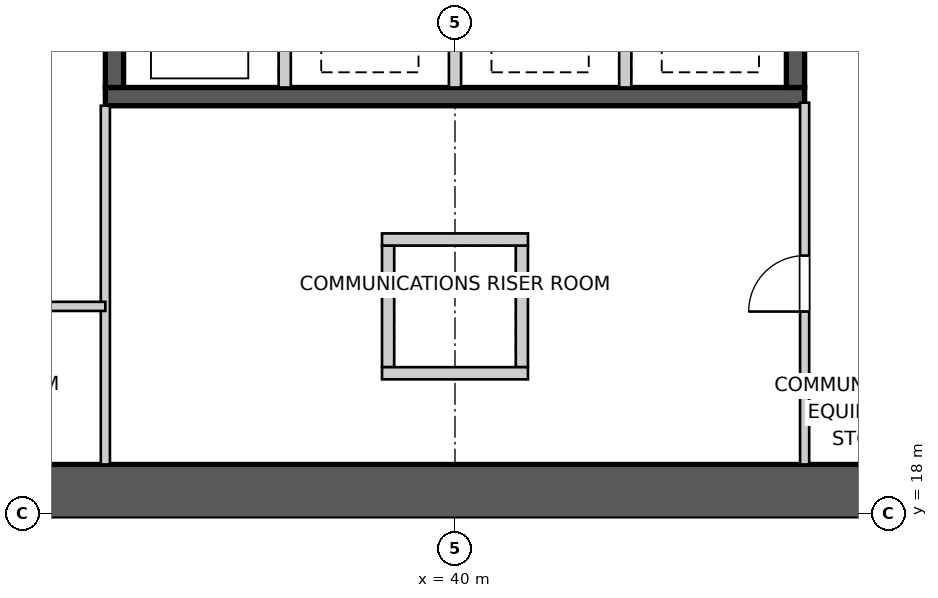
"""IFC4 building model, lengths in metres.
Left out: names, types, materials, properties, quantities, classifications, styles, units other than length and angle.
Written with IfcOpenShell. Run it as: python <this file> out.ifc"""

import sys

from ifc_helpers import new_model, si_unit, direction, frame, frame_2d, origin, place, context, subcontext, project, spatial, polyline, rectangle, outline, extrude, element, fill, save


model = new_model("IFC4")
c1 = context("Model", 3, precision=1e-05, world=origin(), true_north=direction((0.0, 1.0)))
c2 = subcontext(c1, "Body", "Model", "MODEL_VIEW")
j1 = project(units=[si_unit("LENGTHUNIT", "METRE"), si_unit("PLANEANGLEUNIT", "RADIAN")], contexts=[c1])
p1 = place(None, origin())
s1 = spatial("IfcSite", under=j1, at=p1, CompositionType="ELEMENT")
p2 = place(p1, origin())
s2 = spatial("IfcBuilding", under=s1, at=p2, CompositionType="ELEMENT")
p3 = place(p2, frame((0.0, 0.0, 35.4)))
s3 = spatial("IfcBuildingStorey", under=s2, at=p3, CompositionType="ELEMENT", Elevation=35.4)
p4 = place(p3, frame((51.2, 18.35, 0.0), z_axis=(0.0, 0.0, 1.0), x_axis=(-1.0, 0.0, 0.0)))
e1 = element("IfcWall", 1, at=p4, inside=s3, PredefinedType="SHEAR", context=c2, shape_type="SweptSolid", body=[
    extrude(outline(polyline([(0.0, -0.45), (22.4, -0.45), (22.4, -0.025), (22.85, -0.025), (22.85, 0.025), (22.4, 0.025), (22.4, 0.45), (0.0, 0.45), (0.0, 0.025), (-0.45, 0.025), (-0.45, -0.025), (0.0, -0.025), (0.0, -0.45)])), origin(), (0.0, 0.0, 1.0), 3.4),
])
p5 = place(p3, frame((45.75, 24.85, 0.0), z_axis=(0.0, 0.0, 1.0), x_axis=(-1.0, 0.0, 0.0)))
e2 = element("IfcWall", 2, at=p5, inside=s3, PredefinedType="SHEAR", context=c2, shape_type="SweptSolid", body=[
    extrude(rectangle(XDim=11.5, YDim=0.3, at=frame_2d((5.75, 0.0))), origin(), (0.0, 0.0, 1.0), 3.4),
])
p6 = place(p3, frame((45.6, 27.8, 0.0), z_axis=(0.0, 0.0, 1.0), x_axis=(0.0, -1.0, 0.0)))
e3 = element("IfcWall", 3, at=p6, inside=s3, PredefinedType="SHEAR", context=c2, shape_type="SweptSolid", body=[
    extrude(rectangle(XDim=2.8, YDim=0.3, at=frame_2d((1.4, 0.0))), origin(), (0.0, 0.0, 1.0), 3.4),
])
for number, where, z_axis, x_axis in (
    (4, (42.8, 27.8, 0.0), (0.0, 0.0, 1.0), (0.0, -1.0, 0.0)),
    (5, (40.0, 27.8, 0.0), (0.0, 0.0, 1.0), (0.0, -1.0, 0.0)),
    (6, (37.2, 27.8, 0.0), (0.0, 0.0, 1.0), (0.0, -1.0, 0.0)),
):
    element("IfcWall", number, at=place(p3, frame(where, z_axis=z_axis, x_axis=x_axis)), inside=s3, PredefinedType="SOLIDWALL", context=c2, shape_type="SweptSolid", body=[
        extrude(rectangle(XDim=2.8, YDim=0.2, at=frame_2d((1.4, 0.0))), origin(), (0.0, 0.0, 1.0), 3.4),
    ])
p7 = place(p3, frame((34.4, 27.8, 0.0), z_axis=(0.0, 0.0, 1.0), x_axis=(0.0, -1.0, 0.0)))
e7 = element("IfcWall", 7, at=p7, inside=s3, PredefinedType="SHEAR", context=c2, shape_type="SweptSolid", body=[
    extrude(rectangle(XDim=2.8, YDim=0.3, at=frame_2d((1.4, 0.0))), origin(), (0.0, 0.0, 1.0), 3.4),
])
for number, where, z_axis, x_axis in (
    (8, (38.9, 22.4, 0.0), (0.0, 0.0, 1.0), (0.0, -1.0, 0.0)),
    (9, (41.1, 22.4, 0.0), (0.0, 0.0, 1.0), (0.0, -1.0, 0.0)),
):
    element("IfcWall", number, at=place(p3, frame(where, z_axis=z_axis, x_axis=x_axis)), inside=s3, PredefinedType="SOLIDWALL", context=c2, shape_type="SweptSolid", body=[
        extrude(rectangle(XDim=2.0, YDim=0.2, at=frame_2d((1.0, 0.0))), origin(), (0.0, 0.0, 1.0), 3.4),
    ])
for number, where, z_axis, x_axis in (
    (10, (38.8, 22.5, 0.0), (0.0, 0.0, 1.0), (1.0, 0.0, 0.0)),
    (11, (38.8, 20.3, 0.0), (0.0, 0.0, 1.0), (1.0, 0.0, 0.0)),
):
    element("IfcWall", number, at=place(p3, frame(where, z_axis=z_axis, x_axis=x_axis)), inside=s3, PredefinedType="SOLIDWALL", context=c2, shape_type="SweptSolid", body=[
        extrude(rectangle(XDim=2.4, YDim=0.2, at=frame_2d((1.2, 0.0))), origin(), (0.0, 0.0, 1.0), 3.4),
    ])
p8 = place(p3, frame((45.75, 18.8, 0.0), z_axis=(0.0, 0.0, 1.0), x_axis=(0.0, 1.0, 0.0)))
e12 = element("IfcWall", 12, at=p8, inside=s3, PredefinedType="SOLIDWALL", context=c2, shape_type="SweptSolid", body=[
    extrude(rectangle(XDim=5.95, YDim=0.15, at=frame_2d((2.975, 0.0))), origin(), (0.0, 0.0, 1.0), 3.25),
])
p9 = place(p8, frame((2.515, 0.0, 0.0)))
e13 = element("IfcOpeningElement", 13, at=p9, cuts=e12, PredefinedType="OPENING", context=c2, shape_type="SweptSolid", body=[
    extrude(rectangle(XDim=0.92, YDim=2.1, at=frame_2d((0.46, 1.05))), frame((0.0, 0.085, 0.0), z_axis=(0.0, -1.0, 0.0), x_axis=(1.0, 0.0, 0.0)), (0.0, 0.0, 1.0), 0.17),
])
p10 = place(p3, frame((34.25, 18.8, 0.0), z_axis=(0.0, 0.0, 1.0), x_axis=(0.0, 1.0, 0.0)))
e14 = element("IfcWall", 14, at=p10, inside=s3, PredefinedType="SOLIDWALL", context=c2, shape_type="SweptSolid", body=[
    extrude(rectangle(XDim=5.9, YDim=0.15, at=frame_2d((2.95, 0.0))), origin(), (0.0, 0.0, 1.0), 3.25),
])
p11 = place(p3, frame((34.25, 21.4, 0.0), z_axis=(0.0, 0.0, 1.0), x_axis=(-1.0, 0.0, 0.0)))
e15 = element("IfcWall", 15, at=p11, inside=s3, PredefinedType="SOLIDWALL", context=c2, shape_type="SweptSolid", body=[
    extrude(rectangle(XDim=5.45, YDim=0.15, at=frame_2d((2.725, 0.0))), origin(), (0.0, 0.0, 1.0), 3.25),
])
p12 = place(p11, frame((2.265, 0.0, 0.0)))
e16 = element("IfcOpeningElement", 16, at=p12, cuts=e15, PredefinedType="OPENING", context=c2, shape_type="SweptSolid", body=[
    extrude(rectangle(XDim=0.92, YDim=2.1, at=frame_2d((0.46, 1.05))), frame((0.0, 0.085, 0.0), z_axis=(0.0, -1.0, 0.0), x_axis=(1.0, 0.0, 0.0)), (0.0, 0.0, 1.0), 0.17),
])
p13 = place(p9, origin())
e17 = element("IfcDoor", 17, at=p13, inside=s3, OperationType="SINGLE_SWING_LEFT", PredefinedType="DOOR", context=c2, shape_type="SweptSolid", body=[
    extrude(rectangle(XDim=0.92, YDim=2.1, at=frame_2d((0.46, 1.05))), frame((0.0, 0.025, 0.0), z_axis=(0.0, -1.0, 0.0), x_axis=(1.0, 0.0, 0.0)), (0.0, 0.0, 1.0), 0.05),
])
fill(e13, e17)
save(model, sys.argv[1])
